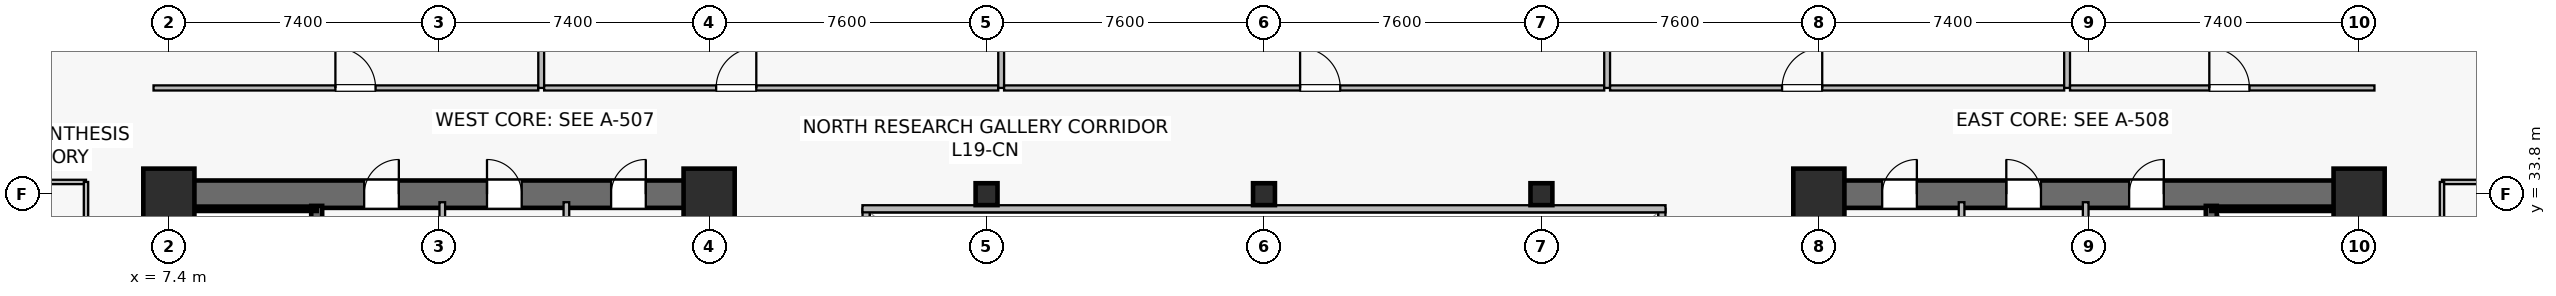
"""IFC4 building model, lengths in metres.
Left out: names, types, materials, properties, quantities, classifications, styles, units other than length and angle.
Written with IfcOpenShell. Run it as: python <this file> out.ifc"""

import sys

from ifc_helpers import new_model, si_unit, direction, frame, frame_2d, origin, origin_2d, place, context, subcontext, project, spatial, rectangle, hollow_rectangle, extrude, source, transform, mapped, element, fill, save


model = new_model("IFC4")
c1 = context("Model", 3, precision=1e-05, world=origin(), true_north=direction((0.0, 1.0)))
c2 = subcontext(c1, "Body", "Model", "MODEL_VIEW")
j1 = project(units=[si_unit("LENGTHUNIT", "METRE"), si_unit("PLANEANGLEUNIT", "RADIAN")], contexts=[c1])
p1 = place(None, origin())
s1 = spatial("IfcSite", under=j1, at=p1, CompositionType="ELEMENT")
p2 = place(p1, origin())
s2 = spatial("IfcBuilding", under=s1, at=p2, CompositionType="ELEMENT")
p3 = place(p2, frame((0.0, 0.0, 78.5)))
s3 = spatial("IfcBuildingStorey", under=s2, at=p3, CompositionType="ELEMENT", Elevation=78.5)
p4 = place(p3, frame((7.025, 33.8, 0.0), z_axis=(0.0, 0.0, 1.0), x_axis=(1.0, 0.0, 0.0)))
e1 = element("IfcWall", 1, at=p4, inside=s3, PredefinedType="SHEAR", context=c2, shape_type="SweptSolid", body=[
    extrude(rectangle(XDim=15.55, YDim=0.75, at=frame_2d((7.775, 0.0))), origin(), (0.0, 0.0, 1.0), 3.78),
])
p5 = place(p4, frame((5.725, 0.0, 0.0)))
e2 = element("IfcOpeningElement", 2, at=p5, cuts=e1, PredefinedType="OPENING", context=c2, shape_type="SweptSolid", body=[
    extrude(rectangle(XDim=0.95, YDim=2.15, at=frame_2d((0.475, 1.075))), frame((0.0, 0.385, 0.0), z_axis=(0.0, -1.0, 0.0), x_axis=(1.0, 0.0, 0.0)), (0.0, 0.0, 1.0), 0.77),
])
p6 = place(p4, frame((9.09, 0.0, 0.0)))
e3 = element("IfcOpeningElement", 3, at=p6, cuts=e1, PredefinedType="OPENING", context=c2, shape_type="SweptSolid", body=[
    extrude(rectangle(XDim=0.95, YDim=2.15, at=frame_2d((0.475, 1.075))), frame((0.0, 0.385, 0.0), z_axis=(0.0, -1.0, 0.0), x_axis=(1.0, 0.0, 0.0)), (0.0, 0.0, 1.0), 0.77),
])
p7 = place(p4, frame((12.49, 0.0, 0.0)))
e4 = element("IfcOpeningElement", 4, at=p7, cuts=e1, PredefinedType="OPENING", context=c2, shape_type="SweptSolid", body=[
    extrude(rectangle(XDim=0.95, YDim=2.15, at=frame_2d((0.475, 1.075))), frame((0.0, 0.385, 0.0), z_axis=(0.0, -1.0, 0.0), x_axis=(1.0, 0.0, 0.0)), (0.0, 0.0, 1.0), 0.77),
])
p8 = place(p3, frame((7.4, 15.175, 0.0), z_axis=(0.0, 0.0, 1.0), x_axis=(0.0, 1.0, 0.0)))
e5 = element("IfcWall", 5, at=p8, inside=s3, PredefinedType="SHEAR", context=c2, shape_type="SweptSolid", body=[
    extrude(rectangle(XDim=18.25, YDim=0.75, at=frame_2d((9.125, 0.0))), origin(), (0.0, 0.0, 1.0), 3.78),
])
p9 = place(p3, frame((22.2, 15.175, 0.0), z_axis=(0.0, 0.0, 1.0), x_axis=(0.0, 1.0, 0.0)))
e6 = element("IfcWall", 6, at=p9, inside=s3, PredefinedType="SHEAR", context=c2, shape_type="SweptSolid", body=[
    extrude(rectangle(XDim=18.25, YDim=0.75, at=frame_2d((9.125, 0.0))), origin(), (0.0, 0.0, 1.0), 3.78),
])
p10 = place(p9, frame((3.375, 0.0, 0.0)))
e7 = element("IfcOpeningElement", 7, at=p10, cuts=e6, PredefinedType="OPENING", context=c2, shape_type="SweptSolid", body=[
    extrude(rectangle(XDim=1.42, YDim=2.2, at=frame_2d((0.71, 1.1))), frame((0.0, 0.385, 0.0), z_axis=(0.0, -1.0, 0.0), x_axis=(1.0, 0.0, 0.0)), (0.0, 0.0, 1.0), 0.77),
])
p11 = place(p3, frame((11.45, 24.85, 0.0), z_axis=(0.0, 0.0, 1.0), x_axis=(0.0, 1.0, 0.0)))
e8 = element("IfcWall", 8, at=p11, inside=s3, PredefinedType="SHEAR", context=c2, shape_type="SweptSolid", body=[
    extrude(rectangle(XDim=8.63, YDim=0.3, at=frame_2d((4.315, 0.0))), origin(), (0.0, 0.0, 1.0), 3.78),
])
p12 = place(p11, frame((0.42, 0.0, 0.0)))
e9 = element("IfcOpeningElement", 9, at=p12, cuts=e8, PredefinedType="OPENING", context=c2, shape_type="SweptSolid", body=[
    extrude(rectangle(XDim=1.1, YDim=2.15, at=frame_2d((0.55, 1.075))), frame((0.0, 0.16, 0.0), z_axis=(0.0, -1.0, 0.0), x_axis=(1.0, 0.0, 0.0)), (0.0, 0.0, 1.0), 0.32),
])
p13 = place(p3, frame((7.73, 33.4, 0.0), z_axis=(0.0, 0.0, 1.0), x_axis=(1.0, 0.0, 0.0)))
e10 = element("IfcWall", 10, at=p13, inside=s3, PredefinedType="SOLIDWALL", context=c2, shape_type="SweptSolid", body=[
    extrude(rectangle(XDim=3.72, YDim=0.12, at=frame_2d((1.86, 0.0))), origin(), (0.0, 0.0, 1.0), 3.78),
])
p14 = place(p3, frame((52.225, 33.8, 0.0), z_axis=(0.0, 0.0, 1.0), x_axis=(1.0, 0.0, 0.0)))
e11 = element("IfcWall", 11, at=p14, inside=s3, PredefinedType="SHEAR", context=c2, shape_type="SweptSolid", body=[
    extrude(rectangle(XDim=15.55, YDim=0.75, at=frame_2d((7.775, 0.0))), origin(), (0.0, 0.0, 1.0), 3.78),
])
p15 = place(p14, frame((8.875, 0.0, 0.0)))
e12 = element("IfcOpeningElement", 12, at=p15, cuts=e11, PredefinedType="OPENING", context=c2, shape_type="SweptSolid", body=[
    extrude(rectangle(XDim=0.95, YDim=2.15, at=frame_2d((0.475, 1.075))), frame((0.0, 0.385, 0.0), z_axis=(0.0, -1.0, 0.0), x_axis=(1.0, 0.0, 0.0)), (0.0, 0.0, 1.0), 0.77),
])
p16 = place(p14, frame((5.51, 0.0, 0.0)))
e13 = element("IfcOpeningElement", 13, at=p16, cuts=e11, PredefinedType="OPENING", context=c2, shape_type="SweptSolid", body=[
    extrude(rectangle(XDim=0.95, YDim=2.15, at=frame_2d((0.475, 1.075))), frame((0.0, 0.385, 0.0), z_axis=(0.0, -1.0, 0.0), x_axis=(1.0, 0.0, 0.0)), (0.0, 0.0, 1.0), 0.77),
])
p17 = place(p14, frame((2.11, 0.0, 0.0)))
e14 = element("IfcOpeningElement", 14, at=p17, cuts=e11, PredefinedType="OPENING", context=c2, shape_type="SweptSolid", body=[
    extrude(rectangle(XDim=0.95, YDim=2.15, at=frame_2d((0.475, 1.075))), frame((0.0, 0.385, 0.0), z_axis=(0.0, -1.0, 0.0), x_axis=(1.0, 0.0, 0.0)), (0.0, 0.0, 1.0), 0.77),
])
p18 = place(p3, frame((52.6, 15.175, 0.0), z_axis=(0.0, 0.0, 1.0), x_axis=(0.0, 1.0, 0.0)))
e15 = element("IfcWall", 15, at=p18, inside=s3, PredefinedType="SHEAR", context=c2, shape_type="SweptSolid", body=[
    extrude(rectangle(XDim=18.25, YDim=0.75, at=frame_2d((9.125, 0.0))), origin(), (0.0, 0.0, 1.0), 3.78),
])
p19 = place(p18, frame((3.375, 0.0, 0.0)))
e16 = element("IfcOpeningElement", 16, at=p19, cuts=e15, PredefinedType="OPENING", context=c2, shape_type="SweptSolid", body=[
    extrude(rectangle(XDim=1.42, YDim=2.2, at=frame_2d((0.71, 1.1))), frame((0.0, 0.385, 0.0), z_axis=(0.0, -1.0, 0.0), x_axis=(1.0, 0.0, 0.0)), (0.0, 0.0, 1.0), 0.77),
])
p20 = place(p3, frame((67.4, 15.175, 0.0), z_axis=(0.0, 0.0, 1.0), x_axis=(0.0, 1.0, 0.0)))
e17 = element("IfcWall", 17, at=p20, inside=s3, PredefinedType="SHEAR", context=c2, shape_type="SweptSolid", body=[
    extrude(rectangle(XDim=18.25, YDim=0.75, at=frame_2d((9.125, 0.0))), origin(), (0.0, 0.0, 1.0), 3.78),
])
p21 = place(p3, frame((63.35, 24.85, 0.0), z_axis=(0.0, 0.0, 1.0), x_axis=(0.0, 1.0, 0.0)))
e18 = element("IfcWall", 18, at=p21, inside=s3, PredefinedType="SHEAR", context=c2, shape_type="SweptSolid", body=[
    extrude(rectangle(XDim=8.63, YDim=0.3, at=frame_2d((4.315, 0.0))), origin(), (0.0, 0.0, 1.0), 3.78),
])
p22 = place(p21, frame((0.42, 0.0, 0.0)))
e19 = element("IfcOpeningElement", 19, at=p22, cuts=e18, PredefinedType="OPENING", context=c2, shape_type="SweptSolid", body=[
    extrude(rectangle(XDim=1.1, YDim=2.15, at=frame_2d((0.55, 1.075))), frame((0.0, 0.16, 0.0), z_axis=(0.0, -1.0, 0.0), x_axis=(1.0, 0.0, 0.0)), (0.0, 0.0, 1.0), 0.32),
])
p23 = place(p3, frame((63.35, 33.4, 0.0), z_axis=(0.0, 0.0, 1.0), x_axis=(1.0, 0.0, 0.0)))
e20 = element("IfcWall", 20, at=p23, inside=s3, PredefinedType="SOLIDWALL", context=c2, shape_type="SweptSolid", body=[
    extrude(rectangle(XDim=3.72, YDim=0.12, at=frame_2d((1.86, 0.0))), origin(), (0.0, 0.0, 1.0), 3.78),
])
m1 = source(origin(), c2, "Body", "SweptSolid", [
    extrude(rectangle(XDim=1.4, YDim=1.4, at=origin_2d()), origin(), (0.0, 0.0, 1.0), 4.1),
])
for number, where, z_axis, x_axis in (
    (21, (7.4, 33.8, 0.0), (0.0, 0.0, 1.0), (1.0, 0.0, 0.0)),
    (22, (22.2, 33.8, 0.0), (0.0, 0.0, 1.0), (1.0, 0.0, 0.0)),
    (23, (52.6, 33.8, 0.0), (0.0, 0.0, 1.0), (1.0, 0.0, 0.0)),
    (24, (67.4, 33.8, 0.0), (0.0, 0.0, 1.0), (1.0, 0.0, 0.0)),
):
    element("IfcColumn", number, at=place(p3, frame(where, z_axis=z_axis, x_axis=x_axis)), inside=s3, PredefinedType="COLUMN", context=c2, shape_type="MappedRepresentation", body=[
        mapped(m1, transform((0.0, 0.0, 0.0), scale=1.0)),
    ])
m2 = source(origin(), c2, "Body", "SweptSolid", [
    extrude(hollow_rectangle(XDim=0.6, YDim=0.6, WallThickness=0.028, at=origin_2d()), origin(), (0.0, 0.0, 1.0), 4.1),
])
for number, where, z_axis, x_axis in (
    (25, (29.8, 33.8, 0.0), (0.0, 0.0, 1.0), (1.0, 0.0, 0.0)),
    (26, (37.4, 33.8, 0.0), (0.0, 0.0, 1.0), (1.0, 0.0, 0.0)),
    (27, (45.0, 33.8, 0.0), (0.0, 0.0, 1.0), (1.0, 0.0, 0.0)),
):
    element("IfcColumn", number, at=place(p3, frame(where, z_axis=z_axis, x_axis=x_axis)), inside=s3, PredefinedType="COLUMN", context=c2, shape_type="MappedRepresentation", body=[
        mapped(m2, transform((0.0, 0.0, 0.0), scale=1.0)),
    ])
p24 = place(p3, frame((14.89, 29.65, 0.0), z_axis=(0.0, 0.0, 1.0), x_axis=(0.0, 1.0, 0.0)))
e28 = element("IfcWall", 28, at=p24, inside=s3, PredefinedType="PLUMBINGWALL", context=c2, shape_type="SweptSolid", body=[
    extrude(rectangle(XDim=3.93, YDim=0.155, at=frame_2d((1.965, 0.0))), origin(), (0.0, 0.0, 1.0), 3.115),
])
p25 = place(p3, frame((18.29, 29.65, 0.0), z_axis=(0.0, 0.0, 1.0), x_axis=(0.0, 1.0, 0.0)))
e29 = element("IfcWall", 29, at=p25, inside=s3, PredefinedType="PLUMBINGWALL", context=c2, shape_type="SweptSolid", body=[
    extrude(rectangle(XDim=3.93, YDim=0.155, at=frame_2d((1.965, 0.0))), origin(), (0.0, 0.0, 1.0), 3.78),
])
p26 = place(p3, frame((59.91, 29.65, 0.0), z_axis=(0.0, 0.0, 1.0), x_axis=(0.0, 1.0, 0.0)))
e30 = element("IfcWall", 30, at=p26, inside=s3, PredefinedType="PLUMBINGWALL", context=c2, shape_type="SweptSolid", body=[
    extrude(rectangle(XDim=3.93, YDim=0.155, at=frame_2d((1.965, 0.0))), origin(), (0.0, 0.0, 1.0), 3.115),
])
p27 = place(p3, frame((56.51, 29.65, 0.0), z_axis=(0.0, 0.0, 1.0), x_axis=(0.0, 1.0, 0.0)))
e31 = element("IfcWall", 31, at=p27, inside=s3, PredefinedType="PLUMBINGWALL", context=c2, shape_type="SweptSolid", body=[
    extrude(rectangle(XDim=3.93, YDim=0.155, at=frame_2d((1.965, 0.0))), origin(), (0.0, 0.0, 1.0), 3.78),
])
p28 = place(p3, frame((26.5, 15.2, 0.0), z_axis=(0.0, 0.0, 1.0), x_axis=(0.0, 1.0, 0.0)))
e32 = element("IfcWall", 32, at=p28, inside=s3, PredefinedType="SOLIDWALL", context=c2, shape_type="SweptSolid", body=[
    extrude(rectangle(XDim=18.2, YDim=0.195, at=frame_2d((9.1, 0.0))), origin(), (0.0, 0.0, 1.0), 3.78),
])
p29 = place(p28, frame((1.8, 0.0, 0.9)))
e33 = element("IfcOpeningElement", 33, at=p29, cuts=e32, PredefinedType="OPENING", context=c2, shape_type="SweptSolid", body=[
    extrude(rectangle(XDim=1.2, YDim=1.35, at=frame_2d((0.6, 0.675))), frame((0.0, 0.107, 0.0), z_axis=(0.0, -1.0, 0.0), x_axis=(1.0, 0.0, 0.0)), (0.0, 0.0, 1.0), 0.215),
])
p30 = place(p28, frame((13.2, 0.0, 0.9)))
e34 = element("IfcOpeningElement", 34, at=p30, cuts=e32, PredefinedType="OPENING", context=c2, shape_type="SweptSolid", body=[
    extrude(rectangle(XDim=1.2, YDim=1.35, at=frame_2d((0.6, 0.675))), frame((0.0, 0.107, 0.0), z_axis=(0.0, -1.0, 0.0), x_axis=(1.0, 0.0, 0.0)), (0.0, 0.0, 1.0), 0.215),
])
p31 = place(p3, frame((48.3, 15.2, 0.0), z_axis=(0.0, 0.0, 1.0), x_axis=(0.0, 1.0, 0.0)))
e35 = element("IfcWall", 35, at=p31, inside=s3, PredefinedType="SOLIDWALL", context=c2, shape_type="SweptSolid", body=[
    extrude(rectangle(XDim=18.2, YDim=0.195, at=frame_2d((9.1, 0.0))), origin(), (0.0, 0.0, 1.0), 3.78),
])
p32 = place(p31, frame((1.8, 0.0, 0.9)))
e36 = element("IfcOpeningElement", 36, at=p32, cuts=e35, PredefinedType="OPENING", context=c2, shape_type="SweptSolid", body=[
    extrude(rectangle(XDim=1.2, YDim=1.35, at=frame_2d((0.6, 0.675))), frame((0.0, 0.107, 0.0), z_axis=(0.0, -1.0, 0.0), x_axis=(1.0, 0.0, 0.0)), (0.0, 0.0, 1.0), 0.215),
])
p33 = place(p31, frame((13.2, 0.0, 0.9)))
e37 = element("IfcOpeningElement", 37, at=p33, cuts=e35, PredefinedType="OPENING", context=c2, shape_type="SweptSolid", body=[
    extrude(rectangle(XDim=1.2, YDim=1.35, at=frame_2d((0.6, 0.675))), frame((0.0, 0.107, 0.0), z_axis=(0.0, -1.0, 0.0), x_axis=(1.0, 0.0, 0.0)), (0.0, 0.0, 1.0), 0.215),
])
p34 = place(p3, frame((26.4, 33.4, 0.0), z_axis=(0.0, 0.0, 1.0), x_axis=(1.0, 0.0, 0.0)))
e38 = element("IfcWall", 38, at=p34, inside=s3, PredefinedType="SOLIDWALL", context=c2, shape_type="SweptSolid", body=[
    extrude(rectangle(XDim=22.0, YDim=0.195, at=frame_2d((11.0, 0.0))), origin(), (0.0, 0.0, 1.0), 3.78),
])
p35 = place(p3, frame((6.98, 36.71, 0.0), z_axis=(0.0, 0.0, 1.0), x_axis=(1.0, 0.0, 0.0)))
e39 = element("IfcWall", 39, at=p35, inside=s3, PredefinedType="PARTITIONING", context=c2, shape_type="SweptSolid", body=[
    extrude(rectangle(XDim=10.54, YDim=0.14, at=frame_2d((5.27, 0.0))), origin(), (0.0, 0.0, 1.0), 3.115),
])
p36 = place(p35, frame((4.982, 0.0, 0.0)))
e40 = element("IfcOpeningElement", 40, at=p36, cuts=e39, PredefinedType="OPENING", context=c2, shape_type="SweptSolid", body=[
    extrude(rectangle(XDim=1.1, YDim=2.18, at=frame_2d((0.55, 1.09))), frame((0.0, 0.08, 0.0), z_axis=(0.0, -1.0, 0.0), x_axis=(1.0, 0.0, 0.0)), (0.0, 0.0, 1.0), 0.16),
])
p37 = place(p3, frame((17.6, 36.71, 0.0), z_axis=(0.0, 0.0, 1.0), x_axis=(0.0, 1.0, 0.0)))
e41 = element("IfcWall", 41, at=p37, inside=s3, PredefinedType="PARTITIONING", context=c2, shape_type="SweptSolid", body=[
    extrude(rectangle(XDim=11.78, YDim=0.16, at=frame_2d((5.89, 0.0))), origin(), (0.0, 0.0, 1.0), 3.015),
])
p38 = place(p3, frame((17.68, 36.71, 0.0), z_axis=(0.0, 0.0, 1.0), x_axis=(1.0, 0.0, 0.0)))
e42 = element("IfcWall", 42, at=p38, inside=s3, PredefinedType="PARTITIONING", context=c2, shape_type="SweptSolid", body=[
    extrude(rectangle(XDim=12.44, YDim=0.14, at=frame_2d((6.22, 0.0))), origin(), (0.0, 0.0, 1.0), 3.115),
])
p39 = place(p38, frame((4.712, 0.0, 0.0)))
e43 = element("IfcOpeningElement", 43, at=p39, cuts=e42, PredefinedType="OPENING", context=c2, shape_type="SweptSolid", body=[
    extrude(rectangle(XDim=1.1, YDim=2.18, at=frame_2d((0.55, 1.09))), frame((0.0, 0.08, 0.0), z_axis=(0.0, -1.0, 0.0), x_axis=(1.0, 0.0, 0.0)), (0.0, 0.0, 1.0), 0.16),
])
p40 = place(p3, frame((30.2, 36.71, 0.0), z_axis=(0.0, 0.0, 1.0), x_axis=(0.0, 1.0, 0.0)))
e44 = element("IfcWall", 44, at=p40, inside=s3, PredefinedType="PARTITIONING", context=c2, shape_type="SweptSolid", body=[
    extrude(rectangle(XDim=10.58, YDim=0.16, at=frame_2d((5.29, 0.0))), origin(), (0.0, 0.0, 1.0), 3.015),
])
p41 = place(p3, frame((30.28, 36.71, 0.0), z_axis=(0.0, 0.0, 1.0), x_axis=(1.0, 0.0, 0.0)))
e45 = element("IfcWall", 45, at=p41, inside=s3, PredefinedType="PARTITIONING", context=c2, shape_type="SweptSolid", body=[
    extrude(rectangle(XDim=16.44, YDim=0.14, at=frame_2d((8.22, 0.0))), origin(), (0.0, 0.0, 1.0), 3.115),
])
p42 = place(p41, frame((8.109, 0.0, 0.0)))
e46 = element("IfcOpeningElement", 46, at=p42, cuts=e45, PredefinedType="OPENING", context=c2, shape_type="SweptSolid", body=[
    extrude(rectangle(XDim=1.1, YDim=2.18, at=frame_2d((0.55, 1.09))), frame((0.0, 0.08, 0.0), z_axis=(0.0, -1.0, 0.0), x_axis=(1.0, 0.0, 0.0)), (0.0, 0.0, 1.0), 0.16),
])
p43 = place(p3, frame((46.8, 36.71, 0.0), z_axis=(0.0, 0.0, 1.0), x_axis=(0.0, 1.0, 0.0)))
e47 = element("IfcWall", 47, at=p43, inside=s3, PredefinedType="PARTITIONING", context=c2, shape_type="SweptSolid", body=[
    extrude(rectangle(XDim=10.58, YDim=0.16, at=frame_2d((5.29, 0.0))), origin(), (0.0, 0.0, 1.0), 3.015),
])
p44 = place(p3, frame((46.88, 36.71, 0.0), z_axis=(0.0, 0.0, 1.0), x_axis=(1.0, 0.0, 0.0)))
e48 = element("IfcWall", 48, at=p44, inside=s3, PredefinedType="PARTITIONING", context=c2, shape_type="SweptSolid", body=[
    extrude(rectangle(XDim=12.44, YDim=0.14, at=frame_2d((6.22, 0.0))), origin(), (0.0, 0.0, 1.0), 3.115),
])
p45 = place(p44, frame((4.712, 0.0, 0.0)))
e49 = element("IfcOpeningElement", 49, at=p45, cuts=e48, PredefinedType="OPENING", context=c2, shape_type="SweptSolid", body=[
    extrude(rectangle(XDim=1.1, YDim=2.18, at=frame_2d((0.55, 1.09))), frame((0.0, 0.08, 0.0), z_axis=(0.0, -1.0, 0.0), x_axis=(1.0, 0.0, 0.0)), (0.0, 0.0, 1.0), 0.16),
])
p46 = place(p3, frame((59.4, 36.71, 0.0), z_axis=(0.0, 0.0, 1.0), x_axis=(0.0, 1.0, 0.0)))
e50 = element("IfcWall", 50, at=p46, inside=s3, PredefinedType="PARTITIONING", context=c2, shape_type="SweptSolid", body=[
    extrude(rectangle(XDim=11.78, YDim=0.16, at=frame_2d((5.89, 0.0))), origin(), (0.0, 0.0, 1.0), 3.015),
])
p47 = place(p3, frame((59.48, 36.71, 0.0), z_axis=(0.0, 0.0, 1.0), x_axis=(1.0, 0.0, 0.0)))
e51 = element("IfcWall", 51, at=p47, inside=s3, PredefinedType="PARTITIONING", context=c2, shape_type="SweptSolid", body=[
    extrude(rectangle(XDim=8.34, YDim=0.14, at=frame_2d((4.17, 0.0))), origin(), (0.0, 0.0, 1.0), 3.115),
])
p48 = place(p47, frame((3.816, 0.0, 0.0)))
e52 = element("IfcOpeningElement", 52, at=p48, cuts=e51, PredefinedType="OPENING", context=c2, shape_type="SweptSolid", body=[
    extrude(rectangle(XDim=1.1, YDim=2.18, at=frame_2d((0.55, 1.09))), frame((0.0, 0.08, 0.0), z_axis=(0.0, -1.0, 0.0), x_axis=(1.0, 0.0, 0.0)), (0.0, 0.0, 1.0), 0.16),
])
p49 = place(p3, frame((0.11, 34.135, 0.0), z_axis=(0.0, 0.0, 1.0), x_axis=(1.0, 0.0, 0.0)))
e53 = element("IfcWall", 53, at=p49, inside=s3, PredefinedType="PARTITIONING", context=c2, shape_type="SweptSolid", body=[
    extrude(rectangle(XDim=5.02, YDim=0.12, at=frame_2d((2.51, 0.0))), origin(), (0.0, 0.0, 1.0), 3.78),
])
p50 = place(p3, frame((5.13, 27.26, 0.0), z_axis=(0.0, 0.0, 1.0), x_axis=(0.0, 1.0, 0.0)))
e54 = element("IfcWall", 54, at=p50, inside=s3, PredefinedType="PARTITIONING", context=c2, shape_type="SweptSolid", body=[
    extrude(rectangle(XDim=6.875, YDim=0.12, at=frame_2d((3.438, 0.0))), origin(), (0.0, 0.0, 1.0), 3.78),
])
p51 = place(p50, frame((2.988, 0.0, 0.0)))
e55 = element("IfcOpeningElement", 55, at=p51, cuts=e54, PredefinedType="OPENING", context=c2, shape_type="SweptSolid", body=[
    extrude(rectangle(XDim=0.9, YDim=2.1, at=frame_2d((0.45, 1.05))), frame((0.0, 0.07, 0.0), z_axis=(0.0, -1.0, 0.0), x_axis=(1.0, 0.0, 0.0)), (0.0, 0.0, 1.0), 0.14),
])
p52 = place(p3, frame((69.67, 34.135, 0.0), z_axis=(0.0, 0.0, 1.0), x_axis=(1.0, 0.0, 0.0)))
e56 = element("IfcWall", 56, at=p52, inside=s3, PredefinedType="PARTITIONING", context=c2, shape_type="SweptSolid", body=[
    extrude(rectangle(XDim=5.02, YDim=0.12, at=frame_2d((2.51, 0.0))), origin(), (0.0, 0.0, 1.0), 3.78),
])
p53 = place(p3, frame((69.67, 14.465, 0.0), z_axis=(0.0, 0.0, 1.0), x_axis=(0.0, 1.0, 0.0)))
e57 = element("IfcWall", 57, at=p53, inside=s3, PredefinedType="PARTITIONING", context=c2, shape_type="SweptSolid", body=[
    extrude(rectangle(XDim=19.67, YDim=0.12, at=frame_2d((9.835, 0.0))), origin(), (0.0, 0.0, 1.0), 3.78),
])
p54 = place(p53, frame((9.385, 0.0, 0.0)))
e58 = element("IfcOpeningElement", 58, at=p54, cuts=e57, PredefinedType="OPENING", context=c2, shape_type="SweptSolid", body=[
    extrude(rectangle(XDim=0.9, YDim=2.1, at=frame_2d((0.45, 1.05))), frame((0.0, 0.07, 0.0), z_axis=(0.0, -1.0, 0.0), x_axis=(1.0, 0.0, 0.0)), (0.0, 0.0, 1.0), 0.14),
])
m3 = source(origin(), c2, "Body", "SweptSolid", [
    extrude(rectangle(XDim=0.95, YDim=2.15, at=frame_2d((0.475, 1.075))), frame((0.0, 0.025, 0.0), z_axis=(0.0, -1.0, 0.0), x_axis=(1.0, 0.0, 0.0)), (0.0, 0.0, 1.0), 0.05),
])
p55 = place(p5, origin())
e59 = element("IfcDoor", 59, at=p55, inside=s3, OperationType="SINGLE_SWING_RIGHT", PredefinedType="DOOR", context=c2, shape_type="MappedRepresentation", body=[
    mapped(m3, transform((0.0, 0.0, 0.0), scale=1.0)),
])
fill(e2, e59)
p56 = place(p6, origin())
e60 = element("IfcDoor", 60, at=p56, inside=s3, OperationType="SINGLE_SWING_LEFT", PredefinedType="DOOR", context=c2, shape_type="MappedRepresentation", body=[
    mapped(m3, transform((0.0, 0.0, 0.0), scale=1.0)),
])
fill(e3, e60)
p57 = place(p7, origin())
e61 = element("IfcDoor", 61, at=p57, inside=s3, OperationType="SINGLE_SWING_RIGHT", PredefinedType="DOOR", context=c2, shape_type="MappedRepresentation", body=[
    mapped(m3, transform((0.0, 0.0, 0.0), scale=1.0)),
])
fill(e4, e61)
p58 = place(p15, origin())
e62 = element("IfcDoor", 62, at=p58, inside=s3, OperationType="SINGLE_SWING_RIGHT", PredefinedType="DOOR", context=c2, shape_type="MappedRepresentation", body=[
    mapped(m3, transform((0.0, 0.0, 0.0), scale=1.0)),
])
fill(e12, e62)
p59 = place(p16, origin())
e63 = element("IfcDoor", 63, at=p59, inside=s3, OperationType="SINGLE_SWING_LEFT", PredefinedType="DOOR", context=c2, shape_type="MappedRepresentation", body=[
    mapped(m3, transform((0.0, 0.0, 0.0), scale=1.0)),
])
fill(e13, e63)
p60 = place(p17, origin())
e64 = element("IfcDoor", 64, at=p60, inside=s3, OperationType="SINGLE_SWING_RIGHT", PredefinedType="DOOR", context=c2, shape_type="MappedRepresentation", body=[
    mapped(m3, transform((0.0, 0.0, 0.0), scale=1.0)),
])
fill(e14, e64)
m4 = source(origin(), c2, "Body", "SweptSolid", [
    extrude(rectangle(XDim=1.1, YDim=2.18, at=frame_2d((0.55, 1.09))), frame((0.0, 0.025, 0.0), z_axis=(0.0, -1.0, 0.0), x_axis=(1.0, 0.0, 0.0)), (0.0, 0.0, 1.0), 0.05),
])
p61 = place(p36, origin())
e65 = element("IfcDoor", 65, at=p61, inside=s3, OperationType="SINGLE_SWING_LEFT", PredefinedType="DOOR", context=c2, shape_type="MappedRepresentation", body=[
    mapped(m4, transform((0.0, 0.0, 0.0), scale=1.0)),
])
fill(e40, e65)
p62 = place(p39, origin())
e66 = element("IfcDoor", 66, at=p62, inside=s3, OperationType="SINGLE_SWING_RIGHT", PredefinedType="DOOR", context=c2, shape_type="MappedRepresentation", body=[
    mapped(m4, transform((0.0, 0.0, 0.0), scale=1.0)),
])
fill(e43, e66)
p63 = place(p42, origin())
e67 = element("IfcDoor", 67, at=p63, inside=s3, OperationType="SINGLE_SWING_LEFT", PredefinedType="DOOR", context=c2, shape_type="MappedRepresentation", body=[
    mapped(m4, transform((0.0, 0.0, 0.0), scale=1.0)),
])
fill(e46, e67)
p64 = place(p45, origin())
e68 = element("IfcDoor", 68, at=p64, inside=s3, OperationType="SINGLE_SWING_RIGHT", PredefinedType="DOOR", context=c2, shape_type="MappedRepresentation", body=[
    mapped(m4, transform((0.0, 0.0, 0.0), scale=1.0)),
])
fill(e49, e68)
p65 = place(p48, origin())
e69 = element("IfcDoor", 69, at=p65, inside=s3, OperationType="SINGLE_SWING_LEFT", PredefinedType="DOOR", context=c2, shape_type="MappedRepresentation", body=[
    mapped(m4, transform((0.0, 0.0, 0.0), scale=1.0)),
])
fill(e52, e69)
save(model, sys.argv[1])
